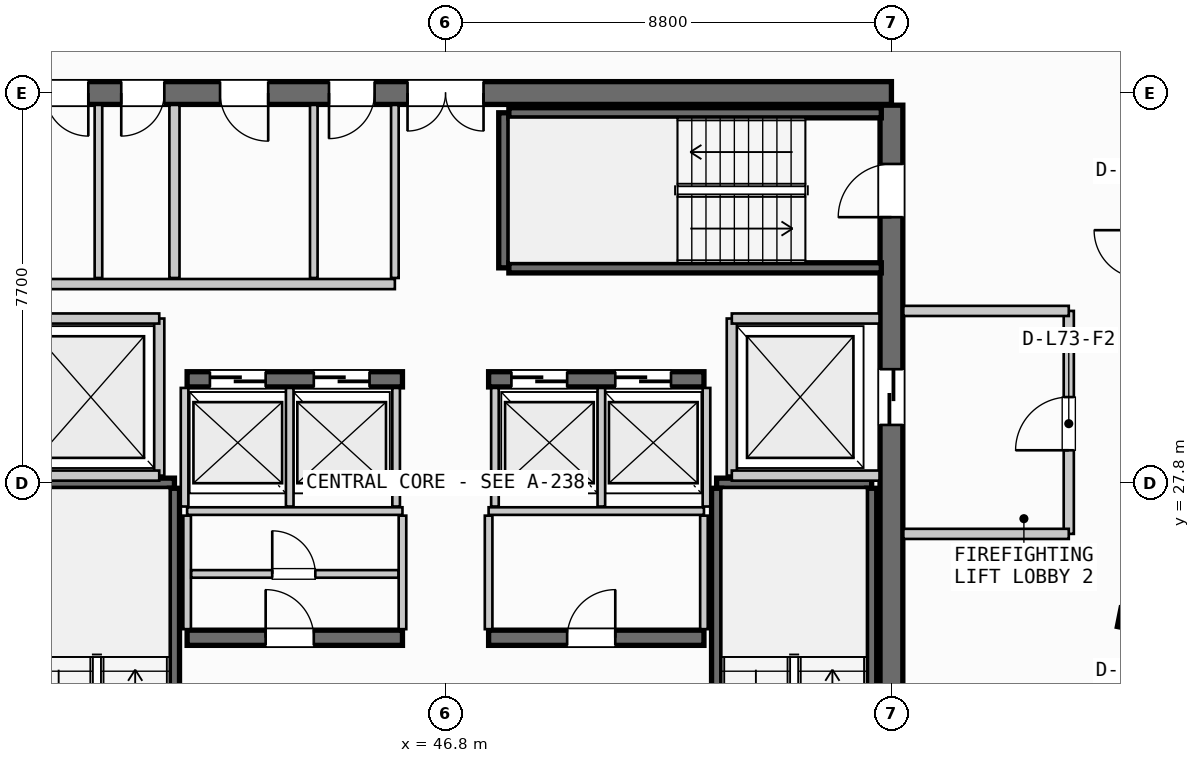
"""IFC4 building model, lengths in metres.
Left out: names, types, materials, properties, quantities, classifications, styles, units other than length and angle.
Written with IfcOpenShell. Run it as: python <this file> out.ifc"""

import sys

from ifc_helpers import new_model, si_unit, direction, frame, frame_2d, origin, origin_2d, place, context, subcontext, project, spatial, rectangle, i_section, extrude, source, transform, mapped, element, fill, save


model = new_model("IFC4")
c1 = context("Model", 3, precision=1e-05, world=origin(), true_north=direction((0.0, 1.0)))
c2 = subcontext(c1, "Body", "Model", "MODEL_VIEW")
j1 = project(units=[si_unit("LENGTHUNIT", "METRE"), si_unit("PLANEANGLEUNIT", "RADIAN")], contexts=[c1])
p1 = place(None, origin())
s1 = spatial("IfcSite", under=j1, at=p1, CompositionType="ELEMENT")
p2 = place(p1, origin())
s2 = spatial("IfcBuilding", under=s1, at=p2, CompositionType="ELEMENT")
p3 = place(p2, frame((0.0, 0.0, 276.7)))
s3 = spatial("IfcBuildingStorey", under=s2, at=p3, CompositionType="ELEMENT", Elevation=276.7)
p4 = place(p3, frame((55.6, 35.5, 0.0), z_axis=(0.0, 0.0, 1.0), x_axis=(-1.0, 0.0, 0.0)))
e1 = element("IfcWall", 1, at=p4, inside=s3, PredefinedType="SHEAR", context=c2, shape_type="SweptSolid", body=[
    extrude(rectangle(XDim=17.6, YDim=0.45, at=frame_2d((8.8, 0.0))), origin(), (0.0, 0.0, 1.0), 3.21),
])
p5 = place(p4, frame((8.05, 0.0, 0.0)))
e2 = element("IfcOpeningElement", 2, at=p5, cuts=e1, PredefinedType="OPENING", context=c2, shape_type="SweptSolid", body=[
    extrude(rectangle(XDim=1.5, YDim=2.2, at=frame_2d((0.75, 1.1))), frame((0.0, 0.235, 0.0), z_axis=(0.0, -1.0, 0.0), x_axis=(1.0, 0.0, 0.0)), (0.0, 0.0, 1.0), 0.47),
])
p6 = place(p4, frame((15.85, 0.0, 0.0)))
e3 = element("IfcOpeningElement", 3, at=p6, cuts=e1, PredefinedType="OPENING", context=c2, shape_type="SweptSolid", body=[
    extrude(rectangle(XDim=0.85, YDim=2.15, at=frame_2d((0.425, 1.075))), frame((0.0, 0.235, 0.0), z_axis=(0.0, -1.0, 0.0), x_axis=(1.0, 0.0, 0.0)), (0.0, 0.0, 1.0), 0.47),
])
p7 = place(p4, frame((14.35, 0.0, 0.0)))
e4 = element("IfcOpeningElement", 4, at=p7, cuts=e1, PredefinedType="OPENING", context=c2, shape_type="SweptSolid", body=[
    extrude(rectangle(XDim=0.85, YDim=2.15, at=frame_2d((0.425, 1.075))), frame((0.0, 0.235, 0.0), z_axis=(0.0, -1.0, 0.0), x_axis=(1.0, 0.0, 0.0)), (0.0, 0.0, 1.0), 0.47),
])
p8 = place(p4, frame((12.3, 0.0, 0.0)))
e5 = element("IfcOpeningElement", 5, at=p8, cuts=e1, PredefinedType="OPENING", context=c2, shape_type="SweptSolid", body=[
    extrude(rectangle(XDim=0.95, YDim=2.15, at=frame_2d((0.475, 1.075))), frame((0.0, 0.235, 0.0), z_axis=(0.0, -1.0, 0.0), x_axis=(1.0, 0.0, 0.0)), (0.0, 0.0, 1.0), 0.47),
])
p9 = place(p4, frame((10.2, 0.0, 0.0)))
e6 = element("IfcOpeningElement", 6, at=p9, cuts=e1, PredefinedType="OPENING", context=c2, shape_type="SweptSolid", body=[
    extrude(rectangle(XDim=0.9, YDim=2.15, at=frame_2d((0.45, 1.075))), frame((0.0, 0.235, 0.0), z_axis=(0.0, -1.0, 0.0), x_axis=(1.0, 0.0, 0.0)), (0.0, 0.0, 1.0), 0.47),
])
p10 = place(p3, frame((55.6, 20.34, 0.0), z_axis=(0.0, 0.0, 1.0), x_axis=(0.0, 1.0, 0.0)))
e7 = element("IfcWall", 7, at=p10, inside=s3, PredefinedType="SHEAR", context=c2, shape_type="SweptSolid", body=[
    extrude(rectangle(XDim=14.92, YDim=0.45, at=frame_2d((7.46, 0.0))), origin(), (0.0, 0.0, 1.0), 3.21),
])
p11 = place(p10, frame((12.71, 0.0, 0.0)))
e8 = element("IfcOpeningElement", 8, at=p11, cuts=e7, PredefinedType="OPENING", context=c2, shape_type="SweptSolid", body=[
    extrude(rectangle(XDim=1.05, YDim=2.15, at=frame_2d((0.525, 1.075))), frame((0.0, 0.235, 0.0), z_axis=(0.0, -1.0, 0.0), x_axis=(1.0, 0.0, 0.0)), (0.0, 0.0, 1.0), 0.47),
])
p12 = place(p10, frame((8.61, 0.0, 0.0)))
e9 = element("IfcOpeningElement", 9, at=p12, cuts=e7, PredefinedType="OPENING", context=c2, shape_type="SweptSolid", body=[
    extrude(rectangle(XDim=1.1, YDim=2.2, at=frame_2d((0.55, 1.1))), frame((0.0, 0.235, 0.0), z_axis=(0.0, -1.0, 0.0), x_axis=(1.0, 0.0, 0.0)), (0.0, 0.0, 1.0), 0.47),
])
p13 = place(p3, frame((41.7, 24.75, 0.0), z_axis=(0.0, 0.0, 1.0), x_axis=(1.0, 0.0, 0.0)))
e10 = element("IfcWall", 10, at=p13, inside=s3, PredefinedType="SHEAR", context=c2, shape_type="SweptSolid", body=[
    extrude(rectangle(XDim=4.25, YDim=0.3, at=frame_2d((2.125, 0.0))), origin(), (0.0, 0.0, 1.0), 3.21),
])
p14 = place(p13, frame((1.55, 0.0, 0.0)))
e11 = element("IfcOpeningElement", 11, at=p14, cuts=e10, PredefinedType="OPENING", context=c2, shape_type="SweptSolid", body=[
    extrude(rectangle(XDim=0.95, YDim=2.15, at=frame_2d((0.475, 1.075))), frame((0.0, 0.16, 0.0), z_axis=(0.0, -1.0, 0.0), x_axis=(1.0, 0.0, 0.0)), (0.0, 0.0, 1.0), 0.32),
])
p15 = place(p3, frame((47.65, 24.75, 0.0), z_axis=(0.0, 0.0, 1.0), x_axis=(1.0, 0.0, 0.0)))
e12 = element("IfcWall", 12, at=p15, inside=s3, PredefinedType="SHEAR", context=c2, shape_type="SweptSolid", body=[
    extrude(rectangle(XDim=4.25, YDim=0.3, at=frame_2d((2.125, 0.0))), origin(), (0.0, 0.0, 1.0), 3.21),
])
p16 = place(p15, frame((1.55, 0.0, 0.0)))
e13 = element("IfcOpeningElement", 13, at=p16, cuts=e12, PredefinedType="OPENING", context=c2, shape_type="SweptSolid", body=[
    extrude(rectangle(XDim=0.95, YDim=2.15, at=frame_2d((0.475, 1.075))), frame((0.0, 0.16, 0.0), z_axis=(0.0, -1.0, 0.0), x_axis=(1.0, 0.0, 0.0)), (0.0, 0.0, 1.0), 0.32),
])
p17 = place(p3, frame((41.7, 29.85, 0.0), z_axis=(0.0, 0.0, 1.0), x_axis=(1.0, 0.0, 0.0)))
e14 = element("IfcWall", 14, at=p17, inside=s3, PredefinedType="SHEAR", context=c2, shape_type="SweptSolid", body=[
    extrude(rectangle(XDim=4.25, YDim=0.3, at=frame_2d((2.125, 0.0))), origin(), (0.0, 0.0, 1.0), 3.21),
])
p18 = place(p17, frame((0.45, 0.0, 0.0)))
e15 = element("IfcOpeningElement", 15, at=p18, cuts=e14, PredefinedType="OPENING", context=c2, shape_type="SweptSolid", body=[
    extrude(rectangle(XDim=1.1, YDim=2.2, at=frame_2d((0.55, 1.1))), frame((0.0, 0.16, 0.0), z_axis=(0.0, -1.0, 0.0), x_axis=(1.0, 0.0, 0.0)), (0.0, 0.0, 1.0), 0.32),
])
p19 = place(p17, frame((2.5, 0.0, 0.0)))
e16 = element("IfcOpeningElement", 16, at=p19, cuts=e14, PredefinedType="OPENING", context=c2, shape_type="SweptSolid", body=[
    extrude(rectangle(XDim=1.1, YDim=2.2, at=frame_2d((0.55, 1.1))), frame((0.0, 0.16, 0.0), z_axis=(0.0, -1.0, 0.0), x_axis=(1.0, 0.0, 0.0)), (0.0, 0.0, 1.0), 0.32),
])
p20 = place(p3, frame((47.65, 29.85, 0.0), z_axis=(0.0, 0.0, 1.0), x_axis=(1.0, 0.0, 0.0)))
e17 = element("IfcWall", 17, at=p20, inside=s3, PredefinedType="SHEAR", context=c2, shape_type="SweptSolid", body=[
    extrude(rectangle(XDim=4.25, YDim=0.3, at=frame_2d((2.125, 0.0))), origin(), (0.0, 0.0, 1.0), 3.21),
])
p21 = place(p20, frame((0.45, 0.0, 0.0)))
e18 = element("IfcOpeningElement", 18, at=p21, cuts=e17, PredefinedType="OPENING", context=c2, shape_type="SweptSolid", body=[
    extrude(rectangle(XDim=1.1, YDim=2.2, at=frame_2d((0.55, 1.1))), frame((0.0, 0.16, 0.0), z_axis=(0.0, -1.0, 0.0), x_axis=(1.0, 0.0, 0.0)), (0.0, 0.0, 1.0), 0.32),
])
p22 = place(p20, frame((2.5, 0.0, 0.0)))
e19 = element("IfcOpeningElement", 19, at=p22, cuts=e17, PredefinedType="OPENING", context=c2, shape_type="SweptSolid", body=[
    extrude(rectangle(XDim=1.1, YDim=2.2, at=frame_2d((0.55, 1.1))), frame((0.0, 0.16, 0.0), z_axis=(0.0, -1.0, 0.0), x_axis=(1.0, 0.0, 0.0)), (0.0, 0.0, 1.0), 0.32),
])
m1 = source(origin(), c2, "Body", "SweptSolid", [
    extrude(i_section(OverallWidth=0.374, OverallDepth=0.383, WebThickness=0.017, FlangeThickness=0.026, FilletRadius=0.015, at=origin_2d()), origin(), (0.0, 0.0, 1.0), 3.21),
])
p23 = place(p3, frame((60.284, 25.118, 0.0), z_axis=(0.0, 0.0, 1.0), x_axis=(0.980785280403, -0.195090322016, 0.0)))
e20 = element("IfcColumn", 20, at=p23, inside=s3, PredefinedType="COLUMN", context=c2, shape_type="MappedRepresentation", body=[
    mapped(m1, transform((0.0, 0.0, 0.0), scale=1.0)),
])
p24 = place(p3, frame((38.39, 27.8, 0.0), z_axis=(0.0, 0.0, 1.0), x_axis=(1.0, 0.0, 0.0)))
e21 = element("IfcWall", 21, at=p24, inside=s3, PredefinedType="SHEAR", context=c2, shape_type="SweptSolid", body=[
    extrude(rectangle(XDim=3.06, YDim=0.2, at=frame_2d((1.53, 0.0))), origin(), (0.0, 0.0, 1.0), 3.21),
])
p25 = place(p3, frame((41.45, 27.7, 0.0), z_axis=(0.0, 0.0, 1.0), x_axis=(0.0, -1.0, 0.0)))
e22 = element("IfcWall", 22, at=p25, inside=s3, PredefinedType="SHEAR", context=c2, shape_type="SweptSolid", body=[
    extrude(rectangle(XDim=7.35, YDim=0.2, at=frame_2d((3.675, 0.0))), origin(), (0.0, 0.0, 1.0), 3.21),
])
p26 = place(p3, frame((52.15, 27.8, 0.0), z_axis=(0.0, 0.0, 1.0), x_axis=(1.0, 0.0, 0.0)))
e23 = element("IfcWall", 23, at=p26, inside=s3, PredefinedType="SHEAR", context=c2, shape_type="SweptSolid", body=[
    extrude(rectangle(XDim=3.06, YDim=0.2, at=frame_2d((1.53, 0.0))), origin(), (0.0, 0.0, 1.0), 3.21),
])
for number, where, z_axis, x_axis in (
    (24, (55.21, 27.7, 0.0), (0.0, 0.0, 1.0), (0.0, -1.0, 0.0)),
    (25, (52.15, 20.35, 0.0), (0.0, 0.0, 1.0), (0.0, 1.0, 0.0)),
):
    element("IfcWall", number, at=place(p3, frame(where, z_axis=z_axis, x_axis=x_axis)), inside=s3, PredefinedType="SHEAR", context=c2, shape_type="SweptSolid", body=[
        extrude(rectangle(XDim=7.35, YDim=0.2, at=frame_2d((3.675, 0.0))), origin(), (0.0, 0.0, 1.0), 3.21),
    ])
p27 = place(p3, frame((47.95, 32.05, 0.0), z_axis=(0.0, 0.0, 1.0), x_axis=(0.0, 1.0, 0.0)))
e26 = element("IfcWall", 26, at=p27, inside=s3, PredefinedType="SHEAR", context=c2, shape_type="SweptSolid", body=[
    extrude(rectangle(XDim=3.06, YDim=0.2, at=frame_2d((1.53, 0.0))), origin(), (0.0, 0.0, 1.0), 3.21),
])
for number, where, z_axis, x_axis in (
    (27, (48.05, 35.11, 0.0), (0.0, 0.0, 1.0), (1.0, 0.0, 0.0)),
    (28, (55.4, 32.05, 0.0), (0.0, 0.0, 1.0), (-1.0, 0.0, 0.0)),
):
    element("IfcWall", number, at=place(p3, frame(where, z_axis=z_axis, x_axis=x_axis)), inside=s3, PredefinedType="SHEAR", context=c2, shape_type="SweptSolid", body=[
        extrude(rectangle(XDim=7.35, YDim=0.2, at=frame_2d((3.675, 0.0))), origin(), (0.0, 0.0, 1.0), 3.21),
    ])
p28 = place(p3, frame((41.15, 27.95, 0.0), z_axis=(0.0, 0.0, 1.0), x_axis=(0.0, 1.0, 0.0)))
e29 = element("IfcWall", 29, at=p28, inside=s3, PredefinedType="PARTITIONING", context=c2, shape_type="SweptSolid", body=[
    extrude(rectangle(XDim=3.1, YDim=0.2, at=frame_2d((1.55, 0.0))), origin(), (0.0, 0.0, 1.0), 2.455),
])
for number, where, z_axis, x_axis in (
    (30, (38.235, 27.95, 0.0), (0.0, 0.0, 1.0), (1.0, 0.0, 0.0)),
    (31, (38.235, 31.05, 0.0), (0.0, 0.0, 1.0), (1.0, 0.0, 0.0)),
):
    element("IfcWall", number, at=place(p3, frame(where, z_axis=z_axis, x_axis=x_axis)), inside=s3, PredefinedType="PARTITIONING", context=c2, shape_type="SweptSolid", body=[
        extrude(rectangle(XDim=2.915, YDim=0.2, at=frame_2d((1.458, 0.0))), origin(), (0.0, 0.0, 1.0), 2.455),
    ])
p29 = place(p3, frame((52.45, 27.95, 0.0), z_axis=(0.0, 0.0, 1.0), x_axis=(0.0, 1.0, 0.0)))
e32 = element("IfcWall", 32, at=p29, inside=s3, PredefinedType="PARTITIONING", context=c2, shape_type="SweptSolid", body=[
    extrude(rectangle(XDim=3.1, YDim=0.2, at=frame_2d((1.55, 0.0))), origin(), (0.0, 0.0, 1.0), 2.455),
])
for number, where, z_axis, x_axis in (
    (33, (52.45, 27.95, 0.0), (0.0, 0.0, 1.0), (1.0, 0.0, 0.0)),
    (34, (52.45, 31.05, 0.0), (0.0, 0.0, 1.0), (1.0, 0.0, 0.0)),
):
    element("IfcWall", number, at=place(p3, frame(where, z_axis=z_axis, x_axis=x_axis)), inside=s3, PredefinedType="PARTITIONING", context=c2, shape_type="SweptSolid", body=[
        extrude(rectangle(XDim=2.915, YDim=0.2, at=frame_2d((1.458, 0.0))), origin(), (0.0, 0.0, 1.0), 2.455),
    ])
p30 = place(p3, frame((59.1, 26.8, 0.0), z_axis=(0.0, 0.0, 1.0), x_axis=(0.0, 1.0, 0.0)))
e35 = element("IfcWall", 35, at=p30, inside=s3, PredefinedType="PARTITIONING", context=c2, shape_type="SweptSolid", body=[
    extrude(rectangle(XDim=4.4, YDim=0.2, at=frame_2d((2.2, 0.0))), origin(), (0.0, 0.0, 1.0), 2.455),
])
p31 = place(p30, frame((1.65, 0.0, 0.0)))
e36 = element("IfcOpeningElement", 36, at=p31, cuts=e35, PredefinedType="OPENING", context=c2, shape_type="SweptSolid", body=[
    extrude(rectangle(XDim=1.05, YDim=2.15, at=frame_2d((0.525, 1.075))), frame((0.0, 0.11, 0.0), z_axis=(0.0, -1.0, 0.0), x_axis=(1.0, 0.0, 0.0)), (0.0, 0.0, 1.0), 0.22),
])
for number, where, z_axis, x_axis in (
    (37, (55.835, 26.8, 0.0), (0.0, 0.0, 1.0), (1.0, 0.0, 0.0)),
    (38, (55.835, 31.2, 0.0), (0.0, 0.0, 1.0), (1.0, 0.0, 0.0)),
):
    element("IfcWall", number, at=place(p3, frame(where, z_axis=z_axis, x_axis=x_axis)), inside=s3, PredefinedType="PARTITIONING", context=c2, shape_type="SweptSolid", body=[
        extrude(rectangle(XDim=3.265, YDim=0.2, at=frame_2d((1.633, 0.0))), origin(), (0.0, 0.0, 1.0), 2.455),
    ])
for number, where, z_axis, x_axis in (
    (39, (41.7, 27.25, 0.0), (0.0, 0.0, 1.0), (1.0, 0.0, 0.0)),
    (40, (47.65, 27.25, 0.0), (0.0, 0.0, 1.0), (1.0, 0.0, 0.0)),
):
    element("IfcWall", number, at=place(p3, frame(where, z_axis=z_axis, x_axis=x_axis)), inside=s3, PredefinedType="PARTITIONING", context=c2, shape_type="SweptSolid", body=[
        extrude(rectangle(XDim=4.25, YDim=0.15, at=frame_2d((2.125, 0.0))), origin(), (0.0, 0.0, 1.0), 2.455),
    ])
for number, where, z_axis, x_axis in (
    (41, (41.7, 24.92, 0.0), (0.0, 0.0, 1.0), (0.0, 1.0, 0.0)),
    (42, (45.95, 24.92, 0.0), (0.0, 0.0, 1.0), (0.0, 1.0, 0.0)),
    (43, (47.65, 24.92, 0.0), (0.0, 0.0, 1.0), (0.0, 1.0, 0.0)),
    (44, (51.9, 24.92, 0.0), (0.0, 0.0, 1.0), (0.0, 1.0, 0.0)),
):
    element("IfcWall", number, at=place(p3, frame(where, z_axis=z_axis, x_axis=x_axis)), inside=s3, PredefinedType="PARTITIONING", context=c2, shape_type="SweptSolid", body=[
        extrude(rectangle(XDim=2.24, YDim=0.15, at=frame_2d((1.12, 0.0))), origin(), (0.0, 0.0, 1.0), 2.455),
    ])
p32 = place(p3, frame((41.78, 26.01, 0.0), z_axis=(0.0, 0.0, 1.0), x_axis=(1.0, 0.0, 0.0)))
e45 = element("IfcWall", 45, at=p32, inside=s3, PredefinedType="PARTITIONING", context=c2, shape_type="SweptSolid", body=[
    extrude(rectangle(XDim=4.09, YDim=0.15, at=frame_2d((2.045, 0.0))), origin(), (0.0, 0.0, 1.0), 2.455),
])
p33 = place(p32, frame((1.6, 0.0, 0.0)))
e46 = element("IfcOpeningElement", 46, at=p33, cuts=e45, PredefinedType="OPENING", context=c2, shape_type="SweptSolid", body=[
    extrude(rectangle(XDim=0.85, YDim=2.15, at=frame_2d((0.425, 1.075))), frame((0.0, 0.085, 0.0), z_axis=(0.0, -1.0, 0.0), x_axis=(1.0, 0.0, 0.0)), (0.0, 0.0, 1.0), 0.17),
])
for number, where, z_axis, x_axis in (
    (47, (41.65, 27.34, 0.0), (0.0, 0.0, 1.0), (0.0, 1.0, 0.0)),
    (48, (43.725, 27.34, 0.0), (0.0, 0.0, 1.0), (0.0, 1.0, 0.0)),
    (49, (45.825, 27.34, 0.0), (0.0, 0.0, 1.0), (0.0, 1.0, 0.0)),
    (50, (47.775, 27.34, 0.0), (0.0, 0.0, 1.0), (0.0, 1.0, 0.0)),
    (51, (49.875, 27.34, 0.0), (0.0, 0.0, 1.0), (0.0, 1.0, 0.0)),
    (52, (51.95, 27.34, 0.0), (0.0, 0.0, 1.0), (0.0, 1.0, 0.0)),
):
    element("IfcWall", number, at=place(p3, frame(where, z_axis=z_axis, x_axis=x_axis)), inside=s3, PredefinedType="PARTITIONING", context=c2, shape_type="SweptSolid", body=[
        extrude(rectangle(XDim=2.34, YDim=0.15, at=frame_2d((1.17, 0.0))), origin(), (0.0, 0.0, 1.0), 2.455),
    ])
p34 = place(p3, frame((41.45, 31.85, 0.0), z_axis=(0.0, 0.0, 1.0), x_axis=(0.0, 1.0, 0.0)))
e53 = element("IfcWall", 53, at=p34, inside=s3, PredefinedType="PARTITIONING", context=c2, shape_type="SweptSolid", body=[
    extrude(rectangle(XDim=3.415, YDim=0.2, at=frame_2d((1.708, 0.0))), origin(), (0.0, 0.0, 1.0), 2.455),
])
p35 = place(p3, frame((38.235, 31.73, 0.0), z_axis=(0.0, 0.0, 1.0), x_axis=(1.0, 0.0, 0.0)))
e54 = element("IfcWall", 54, at=p35, inside=s3, PredefinedType="PARTITIONING", context=c2, shape_type="SweptSolid", body=[
    extrude(rectangle(XDim=7.565, YDim=0.2, at=frame_2d((3.782, 0.0))), origin(), (0.0, 0.0, 1.0), 2.455),
])
for number, where, z_axis, x_axis in (
    (55, (45.8, 31.85, 0.0), (0.0, 0.0, 1.0), (0.0, 1.0, 0.0)),
    (56, (39.95, 31.85, 0.0), (0.0, 0.0, 1.0), (0.0, 1.0, 0.0)),
):
    element("IfcWall", number, at=place(p3, frame(where, z_axis=z_axis, x_axis=x_axis)), inside=s3, PredefinedType="PARTITIONING", context=c2, shape_type="SweptSolid", body=[
        extrude(rectangle(XDim=3.415, YDim=0.15, at=frame_2d((1.708, 0.0))), origin(), (0.0, 0.0, 1.0), 2.455),
    ])
p36 = place(p3, frame((44.2, 31.85, 0.0), z_axis=(0.0, 0.0, 1.0), x_axis=(0.0, 1.0, 0.0)))
e57 = element("IfcWall", 57, at=p36, inside=s3, PredefinedType="PLUMBINGWALL", context=c2, shape_type="SweptSolid", body=[
    extrude(rectangle(XDim=3.415, YDim=0.15, at=frame_2d((1.708, 0.0))), origin(), (0.0, 0.0, 1.0), 2.455),
])
m2 = source(origin(), c2, "Body", "SweptSolid", [
    extrude(rectangle(XDim=1.05, YDim=2.15, at=frame_2d((0.525, 1.075))), frame((0.0, 0.025, 0.0), z_axis=(0.0, -1.0, 0.0), x_axis=(1.0, 0.0, 0.0)), (0.0, 0.0, 1.0), 0.05),
])
p37 = place(p11, origin())
e58 = element("IfcDoor", 58, at=p37, inside=s3, OperationType="SINGLE_SWING_LEFT", PredefinedType="DOOR", context=c2, shape_type="MappedRepresentation", body=[
    mapped(m2, transform((0.0, 0.0, 0.0), scale=1.0)),
])
fill(e8, e58)
m3 = source(origin(), c2, "Body", "SweptSolid", [
    extrude(rectangle(XDim=1.5, YDim=2.2, at=frame_2d((0.75, 1.1))), frame((0.0, 0.025, 0.0), z_axis=(0.0, -1.0, 0.0), x_axis=(1.0, 0.0, 0.0)), (0.0, 0.0, 1.0), 0.05),
])
p38 = place(p5, origin())
e59 = element("IfcDoor", 59, at=p38, inside=s3, OperationType="DOUBLE_DOOR_SINGLE_SWING", PredefinedType="DOOR", context=c2, shape_type="MappedRepresentation", body=[
    mapped(m3, transform((0.0, 0.0, 0.0), scale=1.0)),
])
fill(e2, e59)
m4 = source(origin(), c2, "Body", "SweptSolid", [
    extrude(rectangle(XDim=1.1, YDim=2.2, at=frame_2d((0.55, 1.1))), frame((0.0, 0.025, 0.0), z_axis=(0.0, -1.0, 0.0), x_axis=(1.0, 0.0, 0.0)), (0.0, 0.0, 1.0), 0.05),
])
p39 = place(p12, origin())
e60 = element("IfcDoor", 60, at=p39, inside=s3, OperationType="SLIDING_TO_RIGHT", PredefinedType="DOOR", context=c2, shape_type="MappedRepresentation", body=[
    mapped(m4, transform((0.0, 0.0, 0.0), scale=1.0)),
])
fill(e9, e60)
m5 = source(origin(), c2, "Body", "SweptSolid", [
    extrude(rectangle(XDim=0.95, YDim=2.15, at=frame_2d((0.475, 1.075))), frame((0.0, 0.025, 0.0), z_axis=(0.0, -1.0, 0.0), x_axis=(1.0, 0.0, 0.0)), (0.0, 0.0, 1.0), 0.05),
])
p40 = place(p14, origin())
e61 = element("IfcDoor", 61, at=p40, inside=s3, OperationType="SINGLE_SWING_LEFT", PredefinedType="DOOR", context=c2, shape_type="MappedRepresentation", body=[
    mapped(m5, transform((0.0, 0.0, 0.0), scale=1.0)),
])
fill(e11, e61)
p41 = place(p16, origin())
e62 = element("IfcDoor", 62, at=p41, inside=s3, OperationType="SINGLE_SWING_RIGHT", PredefinedType="DOOR", context=c2, shape_type="MappedRepresentation", body=[
    mapped(m5, transform((0.0, 0.0, 0.0), scale=1.0)),
])
fill(e13, e62)
p42 = place(p18, origin())
e63 = element("IfcDoor", 63, at=p42, inside=s3, OperationType="SLIDING_TO_LEFT", PredefinedType="DOOR", context=c2, shape_type="MappedRepresentation", body=[
    mapped(m4, transform((0.0, 0.0, 0.0), scale=1.0)),
])
fill(e15, e63)
p43 = place(p19, origin())
e64 = element("IfcDoor", 64, at=p43, inside=s3, OperationType="SLIDING_TO_LEFT", PredefinedType="DOOR", context=c2, shape_type="MappedRepresentation", body=[
    mapped(m4, transform((0.0, 0.0, 0.0), scale=1.0)),
])
fill(e16, e64)
p44 = place(p21, origin())
e65 = element("IfcDoor", 65, at=p44, inside=s3, OperationType="SLIDING_TO_LEFT", PredefinedType="DOOR", context=c2, shape_type="MappedRepresentation", body=[
    mapped(m4, transform((0.0, 0.0, 0.0), scale=1.0)),
])
fill(e18, e65)
p45 = place(p22, origin())
e66 = element("IfcDoor", 66, at=p45, inside=s3, OperationType="SLIDING_TO_LEFT", PredefinedType="DOOR", context=c2, shape_type="MappedRepresentation", body=[
    mapped(m4, transform((0.0, 0.0, 0.0), scale=1.0)),
])
fill(e19, e66)
m6 = source(origin(), c2, "Body", "SweptSolid", [
    extrude(rectangle(XDim=0.85, YDim=2.15, at=frame_2d((0.425, 1.075))), frame((0.0, 0.025, 0.0), z_axis=(0.0, -1.0, 0.0), x_axis=(1.0, 0.0, 0.0)), (0.0, 0.0, 1.0), 0.05),
])
p46 = place(p6, origin())
e67 = element("IfcDoor", 67, at=p46, inside=s3, OperationType="SINGLE_SWING_LEFT", PredefinedType="DOOR", context=c2, shape_type="MappedRepresentation", body=[
    mapped(m6, transform((0.0, 0.0, 0.0), scale=1.0)),
])
fill(e3, e67)
p47 = place(p7, origin())
e68 = element("IfcDoor", 68, at=p47, inside=s3, OperationType="SINGLE_SWING_RIGHT", PredefinedType="DOOR", context=c2, shape_type="MappedRepresentation", body=[
    mapped(m6, transform((0.0, 0.0, 0.0), scale=1.0)),
])
fill(e4, e68)
p48 = place(p8, origin())
e69 = element("IfcDoor", 69, at=p48, inside=s3, OperationType="SINGLE_SWING_LEFT", PredefinedType="DOOR", context=c2, shape_type="MappedRepresentation", body=[
    mapped(m5, transform((0.0, 0.0, 0.0), scale=1.0)),
])
fill(e5, e69)
m7 = source(origin(), c2, "Body", "SweptSolid", [
    extrude(rectangle(XDim=0.9, YDim=2.15, at=frame_2d((0.45, 1.075))), frame((0.0, 0.025, 0.0), z_axis=(0.0, -1.0, 0.0), x_axis=(1.0, 0.0, 0.0)), (0.0, 0.0, 1.0), 0.05),
])
p49 = place(p9, origin())
e70 = element("IfcDoor", 70, at=p49, inside=s3, OperationType="SINGLE_SWING_RIGHT", PredefinedType="DOOR", context=c2, shape_type="MappedRepresentation", body=[
    mapped(m7, transform((0.0, 0.0, 0.0), scale=1.0)),
])
fill(e6, e70)
p50 = place(p31, origin())
e71 = element("IfcDoor", 71, at=p50, inside=s3, OperationType="SINGLE_SWING_LEFT", PredefinedType="DOOR", context=c2, shape_type="MappedRepresentation", body=[
    mapped(m2, transform((0.0, 0.0, 0.0), scale=1.0)),
])
fill(e36, e71)
p51 = place(p33, origin())
e72 = element("IfcDoor", 72, at=p51, inside=s3, OperationType="SINGLE_SWING_LEFT", PredefinedType="DOOR", context=c2, shape_type="MappedRepresentation", body=[
    mapped(m6, transform((0.0, 0.0, 0.0), scale=1.0)),
])
fill(e46, e72)
save(model, sys.argv[1])
